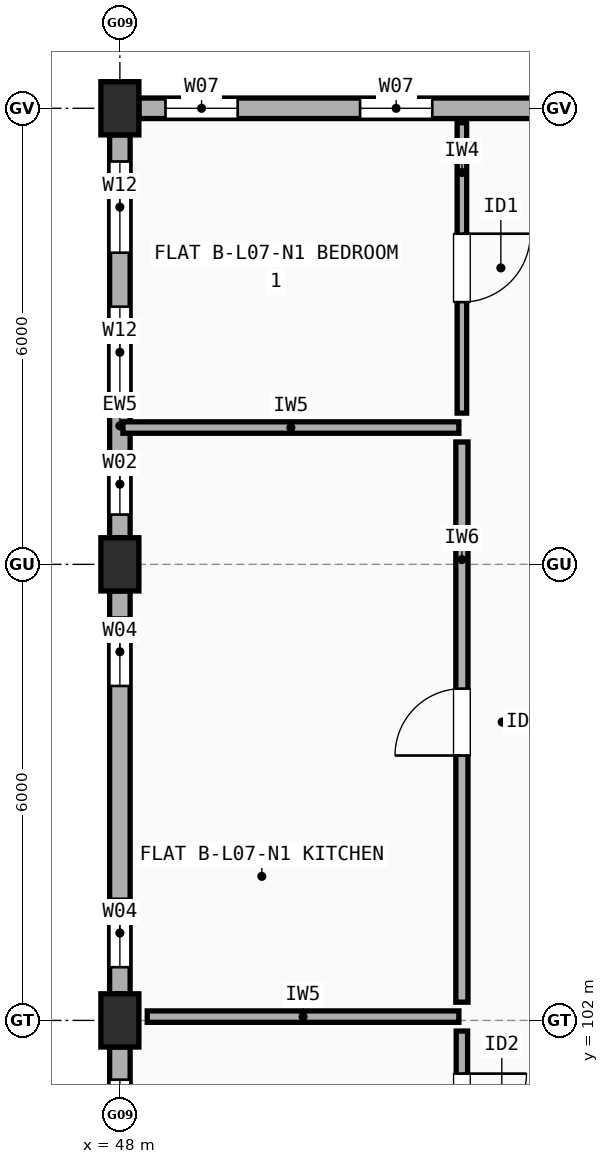
"""IFC4 building model, lengths in metres.
Left out: names, types, materials, properties, quantities, classifications, styles, units other than length and angle.
Written with IfcOpenShell. Run it as: python <this file> out.ifc"""

import sys

from ifc_helpers import new_model, si_unit, direction, frame, frame_2d, origin, origin_2d, place, context, subcontext, project, spatial, rectangle, extrude, element, fill, save


model = new_model("IFC4")
c1 = context("Model", 3, precision=1e-05, world=origin(), true_north=direction((0.0, 1.0)))
c2 = subcontext(c1, "Body", "Model", "MODEL_VIEW")
j1 = project(units=[si_unit("LENGTHUNIT", "METRE"), si_unit("PLANEANGLEUNIT", "RADIAN")], contexts=[c1])
p1 = place(None, origin())
s1 = spatial("IfcSite", under=j1, at=p1, CompositionType="ELEMENT")
p2 = place(p1, origin())
s2 = spatial("IfcBuilding", under=s1, at=p2, CompositionType="ELEMENT")
p3 = place(p2, frame((0.0, 0.0, 23.7)))
s3 = spatial("IfcBuildingStorey", under=s2, at=p3, CompositionType="ELEMENT", Elevation=23.7)
for number, where, z_axis, x_axis in (
    (1, (48.0, 102.0, 0.0), (0.0, 0.0, 1.0), (1.0, 0.0, 0.0)),
    (2, (48.0, 108.0, 0.0), (0.0, 0.0, 1.0), (1.0, 0.0, 0.0)),
    (3, (48.0, 114.0, 0.0), (0.0, 0.0, 1.0), (1.0, 0.0, 0.0)),
):
    element("IfcColumn", number, at=place(p3, frame(where, z_axis=z_axis, x_axis=x_axis)), inside=s3, PredefinedType="COLUMN", context=c2, shape_type="SweptSolid", body=[
        extrude(rectangle(XDim=0.5, YDim=0.7, at=origin_2d()), origin(), (0.0, 0.0, 1.0), 2.975),
    ])
p4 = place(p3, frame((53.725, 114.0, 0.0), z_axis=(0.0, 0.0, 1.0), x_axis=(-1.0, 0.0, 0.0)))
e4 = element("IfcWall", 4, at=p4, inside=s3, PredefinedType="STANDARD", context=c2, shape_type="SweptSolid", body=[
    extrude(rectangle(XDim=5.475, YDim=0.27, at=frame_2d((2.738, 0.0))), origin(), (0.0, 0.0, 1.0), 2.457),
])
p5 = place(p4, frame((1.615, 0.0, 0.9)))
e5 = element("IfcOpeningElement", 5, at=p5, cuts=e4, PredefinedType="OPENING", context=c2, shape_type="SweptSolid", body=[
    extrude(rectangle(XDim=0.95, YDim=1.35, at=frame_2d((0.475, 0.675))), frame((0.0, 0.145, 0.0), z_axis=(0.0, -1.0, 0.0), x_axis=(1.0, 0.0, 0.0)), (0.0, 0.0, 1.0), 0.29),
])
p6 = place(p4, frame((4.175, 0.0, 0.9)))
e6 = element("IfcOpeningElement", 6, at=p6, cuts=e4, PredefinedType="OPENING", context=c2, shape_type="SweptSolid", body=[
    extrude(rectangle(XDim=0.95, YDim=1.35, at=frame_2d((0.475, 0.675))), frame((0.0, 0.145, 0.0), z_axis=(0.0, -1.0, 0.0), x_axis=(1.0, 0.0, 0.0)), (0.0, 0.0, 1.0), 0.29),
])
p7 = place(p3, frame((48.0, 113.65, 0.0), z_axis=(0.0, 0.0, 1.0), x_axis=(0.0, -1.0, 0.0)))
e7 = element("IfcWall", 7, at=p7, inside=s3, PredefinedType="STANDARD", context=c2, shape_type="SweptSolid", body=[
    extrude(rectangle(XDim=5.3, YDim=0.27, at=frame_2d((2.65, 0.0))), origin(), (0.0, 0.0, 1.0), 2.457),
])
p8 = place(p7, frame((0.35, 0.0, 0.9)))
e8 = element("IfcOpeningElement", 8, at=p8, cuts=e7, PredefinedType="OPENING", context=c2, shape_type="SweptSolid", body=[
    extrude(rectangle(XDim=1.2, YDim=1.35, at=frame_2d((0.6, 0.675))), frame((0.0, 0.145, 0.0), z_axis=(0.0, -1.0, 0.0), x_axis=(1.0, 0.0, 0.0)), (0.0, 0.0, 1.0), 0.29),
])
p9 = place(p7, frame((2.26, 0.0, 0.9)))
e9 = element("IfcOpeningElement", 9, at=p9, cuts=e7, PredefinedType="OPENING", context=c2, shape_type="SweptSolid", body=[
    extrude(rectangle(XDim=1.2, YDim=1.35, at=frame_2d((0.6, 0.675))), frame((0.0, 0.145, 0.0), z_axis=(0.0, -1.0, 0.0), x_axis=(1.0, 0.0, 0.0)), (0.0, 0.0, 1.0), 0.29),
])
p10 = place(p7, frame((4.195, 0.0, 0.9)))
e10 = element("IfcOpeningElement", 10, at=p10, cuts=e7, PredefinedType="OPENING", context=c2, shape_type="SweptSolid", body=[
    extrude(rectangle(XDim=0.8, YDim=1.2, at=frame_2d((0.4, 0.6))), frame((0.0, 0.145, 0.0), z_axis=(0.0, -1.0, 0.0), x_axis=(1.0, 0.0, 0.0)), (0.0, 0.0, 1.0), 0.29),
])
p11 = place(p3, frame((48.0, 107.65, 0.0), z_axis=(0.0, 0.0, 1.0), x_axis=(0.0, -1.0, 0.0)))
e11 = element("IfcWall", 11, at=p11, inside=s3, PredefinedType="STANDARD", context=c2, shape_type="SweptSolid", body=[
    extrude(rectangle(XDim=5.3, YDim=0.27, at=frame_2d((2.65, 0.0))), origin(), (0.0, 0.0, 1.0), 2.457),
])
p12 = place(p11, frame((0.35, 0.0, 0.9)))
e12 = element("IfcOpeningElement", 12, at=p12, cuts=e11, PredefinedType="OPENING", context=c2, shape_type="SweptSolid", body=[
    extrude(rectangle(XDim=0.9, YDim=1.3, at=frame_2d((0.45, 0.65))), frame((0.0, 0.145, 0.0), z_axis=(0.0, -1.0, 0.0), x_axis=(1.0, 0.0, 0.0)), (0.0, 0.0, 1.0), 0.29),
])
p13 = place(p11, frame((4.05, 0.0, 0.9)))
e13 = element("IfcOpeningElement", 13, at=p13, cuts=e11, PredefinedType="OPENING", context=c2, shape_type="SweptSolid", body=[
    extrude(rectangle(XDim=0.9, YDim=1.3, at=frame_2d((0.45, 0.65))), frame((0.0, 0.145, 0.0), z_axis=(0.0, -1.0, 0.0), x_axis=(1.0, 0.0, 0.0)), (0.0, 0.0, 1.0), 0.29),
])
p14 = place(p3, frame((48.0, 101.65, 0.0), z_axis=(0.0, 0.0, 1.0), x_axis=(0.0, -1.0, 0.0)))
e14 = element("IfcWall", 14, at=p14, inside=s3, PredefinedType="STANDARD", context=c2, shape_type="SweptSolid", body=[
    extrude(rectangle(XDim=5.3, YDim=0.27, at=frame_2d((2.65, 0.0))), origin(), (0.0, 0.0, 1.0), 2.457),
])
p15 = place(p14, frame((0.43, 0.0, 0.9)))
e15 = element("IfcOpeningElement", 15, at=p15, cuts=e14, PredefinedType="OPENING", context=c2, shape_type="SweptSolid", body=[
    extrude(rectangle(XDim=1.05, YDim=1.35, at=frame_2d((0.525, 0.675))), frame((0.0, 0.145, 0.0), z_axis=(0.0, -1.0, 0.0), x_axis=(1.0, 0.0, 0.0)), (0.0, 0.0, 1.0), 0.29),
])
p16 = place(p14, frame((3.045, 0.0, 0.9)))
e16 = element("IfcOpeningElement", 16, at=p16, cuts=e14, PredefinedType="OPENING", context=c2, shape_type="SweptSolid", body=[
    extrude(rectangle(XDim=1.2, YDim=1.35, at=frame_2d((0.6, 0.675))), frame((0.0, 0.145, 0.0), z_axis=(0.0, -1.0, 0.0), x_axis=(1.0, 0.0, 0.0)), (0.0, 0.0, 1.0), 0.29),
])
p17 = place(p3, frame((52.5, 109.99, 0.0), z_axis=(0.0, 0.0, 1.0), x_axis=(0.0, 1.0, 0.0)))
e17 = element("IfcWall", 17, at=p17, inside=s3, PredefinedType="PARTITIONING", context=c2, shape_type="SweptSolid", body=[
    extrude(rectangle(XDim=3.82, YDim=0.125, at=frame_2d((1.91, 0.0))), origin(), (0.0, 0.0, 1.0), 2.975),
])
p18 = place(p17, frame((1.46, 0.0, 0.0)))
e18 = element("IfcOpeningElement", 18, at=p18, cuts=e17, PredefinedType="OPENING", context=c2, shape_type="SweptSolid", body=[
    extrude(rectangle(XDim=0.9, YDim=2.1, at=frame_2d((0.45, 1.05))), frame((0.0, 0.073, 0.0), z_axis=(0.0, -1.0, 0.0), x_axis=(1.0, 0.0, 0.0)), (0.0, 0.0, 1.0), 0.145),
])
p19 = place(p3, frame((52.5, 102.24, 0.0), z_axis=(0.0, 0.0, 1.0), x_axis=(0.0, 1.0, 0.0)))
e19 = element("IfcWall", 19, at=p19, inside=s3, PredefinedType="PLUMBINGWALL", context=c2, shape_type="SweptSolid", body=[
    extrude(rectangle(XDim=7.37, YDim=0.16, at=frame_2d((3.685, 0.0))), origin(), (0.0, 0.0, 1.0), 2.457),
])
p20 = place(p19, frame((3.245, 0.0, 0.0)))
e20 = element("IfcOpeningElement", 20, at=p20, cuts=e19, PredefinedType="OPENING", context=c2, shape_type="SweptSolid", body=[
    extrude(rectangle(XDim=0.88, YDim=2.1, at=frame_2d((0.44, 1.05))), frame((0.0, 0.09, 0.0), z_axis=(0.0, -1.0, 0.0), x_axis=(1.0, 0.0, 0.0)), (0.0, 0.0, 1.0), 0.18),
])
p21 = place(p3, frame((52.5, 99.89, 0.0), z_axis=(0.0, 0.0, 1.0), x_axis=(0.0, 1.0, 0.0)))
e21 = element("IfcWall", 21, at=p21, inside=s3, PredefinedType="PARTITIONING", context=c2, shape_type="SweptSolid", body=[
    extrude(rectangle(XDim=1.97, YDim=0.15, at=frame_2d((0.985, 0.0))), origin(), (0.0, 0.0, 1.0), 2.975),
])
p22 = place(p21, frame((0.56, 0.0, 0.0)))
e22 = element("IfcOpeningElement", 22, at=p22, cuts=e21, PredefinedType="OPENING", context=c2, shape_type="SweptSolid", body=[
    extrude(rectangle(XDim=0.85, YDim=2.1, at=frame_2d((0.425, 1.05))), frame((0.0, 0.085, 0.0), z_axis=(0.0, -1.0, 0.0), x_axis=(1.0, 0.0, 0.0)), (0.0, 0.0, 1.0), 0.17),
])
p23 = place(p3, frame((48.04, 109.8, 0.0), z_axis=(0.0, 0.0, 1.0), x_axis=(1.0, 0.0, 0.0)))
e23 = element("IfcWall", 23, at=p23, inside=s3, PredefinedType="PARTITIONING", context=c2, shape_type="SweptSolid", body=[
    extrude(rectangle(XDim=4.42, YDim=0.15, at=frame_2d((2.21, 0.0))), origin(), (0.0, 0.0, 1.0), 2.457),
])
p24 = place(p3, frame((48.36, 102.05, 0.0), z_axis=(0.0, 0.0, 1.0), x_axis=(1.0, 0.0, 0.0)))
e24 = element("IfcWall", 24, at=p24, inside=s3, PredefinedType="PARTITIONING", context=c2, shape_type="SweptSolid", body=[
    extrude(rectangle(XDim=4.1, YDim=0.15, at=frame_2d((2.05, 0.0))), origin(), (0.0, 0.0, 1.0), 2.457),
])
p25 = place(p5, origin())
e25 = element("IfcWindow", 25, at=p25, inside=s3, PartitioningType="SINGLE_PANEL", PredefinedType="WINDOW", context=c2, shape_type="SweptSolid", body=[
    extrude(rectangle(XDim=0.95, YDim=1.35, at=frame_2d((0.475, 0.675))), frame((0.0, 0.03, 0.0), z_axis=(0.0, -1.0, 0.0), x_axis=(1.0, 0.0, 0.0)), (0.0, 0.0, 1.0), 0.06),
])
fill(e5, e25)
p26 = place(p6, origin())
e26 = element("IfcWindow", 26, at=p26, inside=s3, PartitioningType="SINGLE_PANEL", PredefinedType="WINDOW", context=c2, shape_type="SweptSolid", body=[
    extrude(rectangle(XDim=0.95, YDim=1.35, at=frame_2d((0.475, 0.675))), frame((0.0, 0.03, 0.0), z_axis=(0.0, -1.0, 0.0), x_axis=(1.0, 0.0, 0.0)), (0.0, 0.0, 1.0), 0.06),
])
fill(e6, e26)
p27 = place(p8, origin())
e27 = element("IfcWindow", 27, at=p27, inside=s3, PartitioningType="SINGLE_PANEL", PredefinedType="WINDOW", context=c2, shape_type="SweptSolid", body=[
    extrude(rectangle(XDim=1.2, YDim=1.35, at=frame_2d((0.6, 0.675))), frame((0.0, 0.03, 0.0), z_axis=(0.0, -1.0, 0.0), x_axis=(1.0, 0.0, 0.0)), (0.0, 0.0, 1.0), 0.06),
])
fill(e8, e27)
p28 = place(p9, origin())
e28 = element("IfcWindow", 28, at=p28, inside=s3, PartitioningType="SINGLE_PANEL", PredefinedType="WINDOW", context=c2, shape_type="SweptSolid", body=[
    extrude(rectangle(XDim=1.2, YDim=1.35, at=frame_2d((0.6, 0.675))), frame((0.0, 0.03, 0.0), z_axis=(0.0, -1.0, 0.0), x_axis=(1.0, 0.0, 0.0)), (0.0, 0.0, 1.0), 0.06),
])
fill(e9, e28)
p29 = place(p10, origin())
e29 = element("IfcWindow", 29, at=p29, inside=s3, PartitioningType="SINGLE_PANEL", PredefinedType="WINDOW", context=c2, shape_type="SweptSolid", body=[
    extrude(rectangle(XDim=0.8, YDim=1.2, at=frame_2d((0.4, 0.6))), frame((0.0, 0.03, 0.0), z_axis=(0.0, -1.0, 0.0), x_axis=(1.0, 0.0, 0.0)), (0.0, 0.0, 1.0), 0.06),
])
fill(e10, e29)
p30 = place(p12, origin())
e30 = element("IfcWindow", 30, at=p30, inside=s3, PartitioningType="SINGLE_PANEL", PredefinedType="WINDOW", context=c2, shape_type="SweptSolid", body=[
    extrude(rectangle(XDim=0.9, YDim=1.3, at=frame_2d((0.45, 0.65))), frame((0.0, 0.03, 0.0), z_axis=(0.0, -1.0, 0.0), x_axis=(1.0, 0.0, 0.0)), (0.0, 0.0, 1.0), 0.06),
])
fill(e12, e30)
p31 = place(p13, origin())
e31 = element("IfcWindow", 31, at=p31, inside=s3, PartitioningType="SINGLE_PANEL", PredefinedType="WINDOW", context=c2, shape_type="SweptSolid", body=[
    extrude(rectangle(XDim=0.9, YDim=1.3, at=frame_2d((0.45, 0.65))), frame((0.0, 0.03, 0.0), z_axis=(0.0, -1.0, 0.0), x_axis=(1.0, 0.0, 0.0)), (0.0, 0.0, 1.0), 0.06),
])
fill(e13, e31)
p32 = place(p15, origin())
e32 = element("IfcWindow", 32, at=p32, inside=s3, PartitioningType="SINGLE_PANEL", PredefinedType="WINDOW", context=c2, shape_type="SweptSolid", body=[
    extrude(rectangle(XDim=1.05, YDim=1.35, at=frame_2d((0.525, 0.675))), frame((0.0, 0.03, 0.0), z_axis=(0.0, -1.0, 0.0), x_axis=(1.0, 0.0, 0.0)), (0.0, 0.0, 1.0), 0.06),
])
fill(e15, e32)
p33 = place(p18, origin())
e33 = element("IfcDoor", 33, at=p33, inside=s3, OperationType="SINGLE_SWING_RIGHT", PredefinedType="DOOR", context=c2, shape_type="SweptSolid", body=[
    extrude(rectangle(XDim=0.9, YDim=2.1, at=frame_2d((0.45, 1.05))), frame((0.0, 0.025, 0.0), z_axis=(0.0, -1.0, 0.0), x_axis=(1.0, 0.0, 0.0)), (0.0, 0.0, 1.0), 0.05),
])
fill(e18, e33)
p34 = place(p20, origin())
e34 = element("IfcDoor", 34, at=p34, inside=s3, OperationType="SINGLE_SWING_LEFT", PredefinedType="DOOR", context=c2, shape_type="SweptSolid", body=[
    extrude(rectangle(XDim=0.88, YDim=2.1, at=frame_2d((0.44, 1.05))), frame((0.0, 0.025, 0.0), z_axis=(0.0, -1.0, 0.0), x_axis=(1.0, 0.0, 0.0)), (0.0, 0.0, 1.0), 0.05),
])
fill(e20, e34)
p35 = place(p22, origin())
e35 = element("IfcDoor", 35, at=p35, inside=s3, OperationType="SINGLE_SWING_RIGHT", PredefinedType="DOOR", context=c2, shape_type="SweptSolid", body=[
    extrude(rectangle(XDim=0.85, YDim=2.1, at=frame_2d((0.425, 1.05))), frame((0.0, 0.025, 0.0), z_axis=(0.0, -1.0, 0.0), x_axis=(1.0, 0.0, 0.0)), (0.0, 0.0, 1.0), 0.05),
])
fill(e22, e35)
save(model, sys.argv[1])
